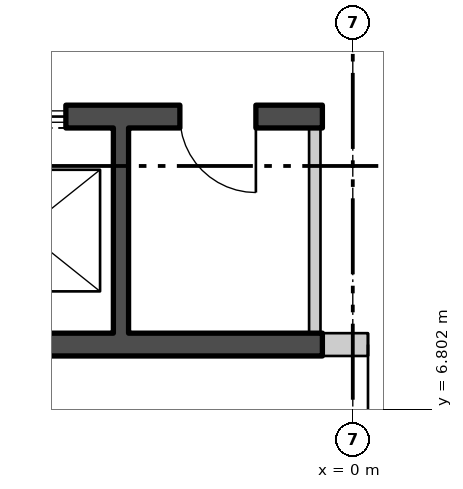
"""IFC4 building model, lengths in metres.
Left out: names, types, materials, properties, quantities, classifications, styles, units other than length and angle.
Written with IfcOpenShell. Run it as: python <this file> out.ifc"""

import sys

from ifc_helpers import new_model, si_unit, direction, frame, frame_2d, origin, place, context, subcontext, project, spatial, polyline, rectangle, outline, extrude, element, fill, save


model = new_model("IFC4")
c1 = context("Model", 3, precision=1e-05, world=origin(), true_north=direction((0.0, 1.0)))
c2 = subcontext(c1, "Body", "Model", "MODEL_VIEW")
j1 = project(units=[si_unit("LENGTHUNIT", "METRE"), si_unit("PLANEANGLEUNIT", "RADIAN")], contexts=[c1])
p1 = place(None, origin())
s1 = spatial("IfcSite", under=j1, at=p1, CompositionType="ELEMENT")
p2 = place(p1, origin())
s2 = spatial("IfcBuilding", under=s1, at=p2, CompositionType="ELEMENT")
p3 = place(p2, frame((0.0, 0.0, 204.3)))
s3 = spatial("IfcBuildingStorey", under=s2, at=p3, CompositionType="ELEMENT", Elevation=204.3)
p4 = place(p3, frame((-26.385, 13.887, -0.18), z_axis=(0.0, 0.0, 1.0), x_axis=(0.499999764979, -0.866025539474, 0.0)))
e1 = element("IfcWall", 1, at=p4, inside=s3, PredefinedType="SOLIDWALL", context=c2, shape_type="SweptSolid", body=[
    extrude(outline(polyline([(-0.13, -0.225), (45.87, -0.225), (45.61, 0.225), (0.13, 0.225), (-0.13, -0.225)])), origin(), (0.0, 0.0, 1.0), 3.68),
])
p5 = place(p4, frame((1.424, 0.0, 1.08)))
e2 = element("IfcOpeningElement", 2, at=p5, cuts=e1, PredefinedType="OPENING", context=c2, shape_type="SweptSolid", body=[
    extrude(rectangle(XDim=2.4, YDim=2.0, at=frame_2d((1.2, 1.0))), frame((0.0, 0.235, 0.0), z_axis=(0.0, -1.0, 0.0), x_axis=(1.0, 0.0, 0.0)), (0.0, 0.0, 1.0), 0.47),
])
p6 = place(p4, frame((5.893, 0.0, 1.08)))
e3 = element("IfcOpeningElement", 3, at=p6, cuts=e1, PredefinedType="OPENING", context=c2, shape_type="SweptSolid", body=[
    extrude(rectangle(XDim=2.4, YDim=2.0, at=frame_2d((1.2, 1.0))), frame((0.0, 0.235, 0.0), z_axis=(0.0, -1.0, 0.0), x_axis=(1.0, 0.0, 0.0)), (0.0, 0.0, 1.0), 0.47),
])
p7 = place(p4, frame((10.401, 0.0, 1.08)))
e4 = element("IfcOpeningElement", 4, at=p7, cuts=e1, PredefinedType="OPENING", context=c2, shape_type="SweptSolid", body=[
    extrude(rectangle(XDim=2.4, YDim=2.0, at=frame_2d((1.2, 1.0))), frame((0.0, 0.235, 0.0), z_axis=(0.0, -1.0, 0.0), x_axis=(1.0, 0.0, 0.0)), (0.0, 0.0, 1.0), 0.47),
])
p8 = place(p4, frame((14.909, 0.0, 1.08)))
e5 = element("IfcOpeningElement", 5, at=p8, cuts=e1, PredefinedType="OPENING", context=c2, shape_type="SweptSolid", body=[
    extrude(rectangle(XDim=2.4, YDim=2.0, at=frame_2d((1.2, 1.0))), frame((0.0, 0.235, 0.0), z_axis=(0.0, -1.0, 0.0), x_axis=(1.0, 0.0, 0.0)), (0.0, 0.0, 1.0), 0.47),
])
p9 = place(p4, frame((19.416, 0.0, 1.08)))
e6 = element("IfcOpeningElement", 6, at=p9, cuts=e1, PredefinedType="OPENING", context=c2, shape_type="SweptSolid", body=[
    extrude(rectangle(XDim=2.4, YDim=2.0, at=frame_2d((1.2, 1.0))), frame((0.0, 0.235, 0.0), z_axis=(0.0, -1.0, 0.0), x_axis=(1.0, 0.0, 0.0)), (0.0, 0.0, 1.0), 0.47),
])
p10 = place(p4, frame((23.924, 0.0, 1.08)))
e7 = element("IfcOpeningElement", 7, at=p10, cuts=e1, PredefinedType="OPENING", context=c2, shape_type="SweptSolid", body=[
    extrude(rectangle(XDim=2.4, YDim=2.0, at=frame_2d((1.2, 1.0))), frame((0.0, 0.235, 0.0), z_axis=(0.0, -1.0, 0.0), x_axis=(1.0, 0.0, 0.0)), (0.0, 0.0, 1.0), 0.47),
])
p11 = place(p4, frame((28.431, 0.0, 1.08)))
e8 = element("IfcOpeningElement", 8, at=p11, cuts=e1, PredefinedType="OPENING", context=c2, shape_type="SweptSolid", body=[
    extrude(rectangle(XDim=2.4, YDim=2.0, at=frame_2d((1.2, 1.0))), frame((0.0, 0.235, 0.0), z_axis=(0.0, -1.0, 0.0), x_axis=(1.0, 0.0, 0.0)), (0.0, 0.0, 1.0), 0.47),
])
p12 = place(p4, frame((32.939, 0.0, 1.08)))
e9 = element("IfcOpeningElement", 9, at=p12, cuts=e1, PredefinedType="OPENING", context=c2, shape_type="SweptSolid", body=[
    extrude(rectangle(XDim=2.4, YDim=2.0, at=frame_2d((1.2, 1.0))), frame((0.0, 0.235, 0.0), z_axis=(0.0, -1.0, 0.0), x_axis=(1.0, 0.0, 0.0)), (0.0, 0.0, 1.0), 0.47),
])
p13 = place(p4, frame((41.916, 0.0, 1.08)))
e10 = element("IfcOpeningElement", 10, at=p13, cuts=e1, PredefinedType="OPENING", context=c2, shape_type="SweptSolid", body=[
    extrude(rectangle(XDim=2.4, YDim=2.0, at=frame_2d((1.2, 1.0))), frame((0.0, 0.235, 0.0), z_axis=(0.0, -1.0, 0.0), x_axis=(1.0, 0.0, 0.0)), (0.0, 0.0, 1.0), 0.47),
])
p14 = place(p3, frame((-10.7, 10.65, 0.0), z_axis=(0.0, 0.0, 1.0), x_axis=(1.0, 0.0, 0.0)))
e11 = element("IfcWall", 11, at=p14, inside=s3, PredefinedType="SHEAR", context=c2, shape_type="SweptSolid", body=[
    extrude(rectangle(XDim=10.3, YDim=0.3, at=frame_2d((5.15, 0.0))), origin(), (0.0, 0.0, 1.0), 3.7),
])
p15 = place(p14, frame((0.675, 0.0, 0.0)))
e12 = element("IfcOpeningElement", 12, at=p15, cuts=e11, PredefinedType="OPENING", context=c2, shape_type="SweptSolid", body=[
    extrude(rectangle(XDim=1.1, YDim=2.1, at=frame_2d((0.55, 1.05))), frame((0.0, 0.16, 0.0), z_axis=(0.0, -1.0, 0.0), x_axis=(1.0, 0.0, 0.0)), (0.0, 0.0, 1.0), 0.32),
])
p16 = place(p14, frame((3.275, 0.0, 0.0)))
e13 = element("IfcOpeningElement", 13, at=p16, cuts=e11, PredefinedType="OPENING", context=c2, shape_type="SweptSolid", body=[
    extrude(rectangle(XDim=1.1, YDim=2.1, at=frame_2d((0.55, 1.05))), frame((0.0, 0.16, 0.0), z_axis=(0.0, -1.0, 0.0), x_axis=(1.0, 0.0, 0.0)), (0.0, 0.0, 1.0), 0.32),
])
p17 = place(p14, frame((5.825, 0.0, 0.0)))
e14 = element("IfcOpeningElement", 14, at=p17, cuts=e11, PredefinedType="OPENING", context=c2, shape_type="SweptSolid", body=[
    extrude(rectangle(XDim=1.1, YDim=2.1, at=frame_2d((0.55, 1.05))), frame((0.0, 0.16, 0.0), z_axis=(0.0, -1.0, 0.0), x_axis=(1.0, 0.0, 0.0)), (0.0, 0.0, 1.0), 0.32),
])
p18 = place(p14, frame((8.425, 0.0, 0.0)))
e15 = element("IfcOpeningElement", 15, at=p18, cuts=e11, PredefinedType="OPENING", context=c2, shape_type="SweptSolid", body=[
    extrude(rectangle(XDim=1.0, YDim=2.1, at=frame_2d((0.5, 1.05))), frame((0.0, 0.16, 0.0), z_axis=(0.0, -1.0, 0.0), x_axis=(1.0, 0.0, 0.0)), (0.0, 0.0, 1.0), 0.32),
])
p19 = place(p3, frame((-10.7, 7.65, 0.0), z_axis=(0.0, 0.0, 1.0), x_axis=(1.0, 0.0, 0.0)))
e16 = element("IfcWall", 16, at=p19, inside=s3, PredefinedType="SHEAR", context=c2, shape_type="SweptSolid", body=[
    extrude(rectangle(XDim=10.3, YDim=0.3, at=frame_2d((5.15, 0.0))), origin(), (0.0, 0.0, 1.0), 3.7),
])
p20 = place(p3, frame((-3.05, 7.8, 0.0), z_axis=(0.0, 0.0, 1.0), x_axis=(0.0, 1.0, 0.0)))
e17 = element("IfcWall", 17, at=p20, inside=s3, PredefinedType="SHEAR", context=c2, shape_type="SweptSolid", body=[
    extrude(rectangle(XDim=2.7, YDim=0.2, at=frame_2d((1.35, 0.0))), origin(), (0.0, 0.0, 1.0), 3.7),
])
p21 = place(p3, frame((-0.5, 7.8, 0.0), z_axis=(0.0, 0.0, 1.0), x_axis=(0.0, 1.0, 0.0)))
e18 = element("IfcWall", 18, at=p21, inside=s3, PredefinedType="PARTITIONING", context=c2, shape_type="SweptSolid", body=[
    extrude(rectangle(XDim=2.7, YDim=0.15, at=frame_2d((1.35, 0.0))), origin(), (0.0, 0.0, 1.0), 3.7),
])
p22 = place(p3, frame((-0.4, 7.65, 0.0), z_axis=(0.0, 0.0, 1.0), x_axis=(1.0, 0.0, 0.0)))
e19 = element("IfcWall", 19, at=p22, inside=s3, PredefinedType="PARTITIONING", context=c2, shape_type="SweptSolid", body=[
    extrude(rectangle(XDim=3.0, YDim=0.3, at=frame_2d((1.5, 0.0))), origin(), (0.0, 0.0, 1.0), 3.7),
])
p23 = place(p22, frame((0.6, 0.0, 0.0)))
e20 = element("IfcOpeningElement", 20, at=p23, cuts=e19, PredefinedType="OPENING", context=c2, shape_type="SweptSolid", body=[
    extrude(rectangle(XDim=1.8, YDim=2.4, at=frame_2d((0.9, 1.2))), frame((0.0, 0.16, 0.0), z_axis=(0.0, -1.0, 0.0), x_axis=(1.0, 0.0, 0.0)), (0.0, 0.0, 1.0), 0.32),
])
p24 = place(p17, origin())
e21 = element("IfcDoor", 21, at=p24, inside=s3, OperationType="SLIDING_TO_LEFT", PredefinedType="DOOR", context=c2, shape_type="SweptSolid", body=[
    extrude(rectangle(XDim=1.1, YDim=2.1, at=frame_2d((0.55, 1.05))), frame((0.0, 0.025, 0.0), z_axis=(0.0, -1.0, 0.0), x_axis=(1.0, 0.0, 0.0)), (0.0, 0.0, 1.0), 0.05),
])
fill(e14, e21)
p25 = place(p18, origin())
e22 = element("IfcDoor", 22, at=p25, inside=s3, OperationType="SINGLE_SWING_RIGHT", PredefinedType="DOOR", context=c2, shape_type="SweptSolid", body=[
    extrude(rectangle(XDim=1.0, YDim=2.1, at=frame_2d((0.5, 1.05))), frame((0.0, 0.025, 0.0), z_axis=(0.0, -1.0, 0.0), x_axis=(1.0, 0.0, 0.0)), (0.0, 0.0, 1.0), 0.05),
])
fill(e15, e22)
p26 = place(p23, origin())
e23 = element("IfcDoor", 23, at=p26, inside=s3, OperationType="DOUBLE_DOOR_SINGLE_SWING", PredefinedType="DOOR", context=c2, shape_type="SweptSolid", body=[
    extrude(rectangle(XDim=1.8, YDim=2.4, at=frame_2d((0.9, 1.2))), frame((0.0, 0.025, 0.0), z_axis=(0.0, -1.0, 0.0), x_axis=(1.0, 0.0, 0.0)), (0.0, 0.0, 1.0), 0.05),
])
fill(e20, e23)
save(model, sys.argv[1])
